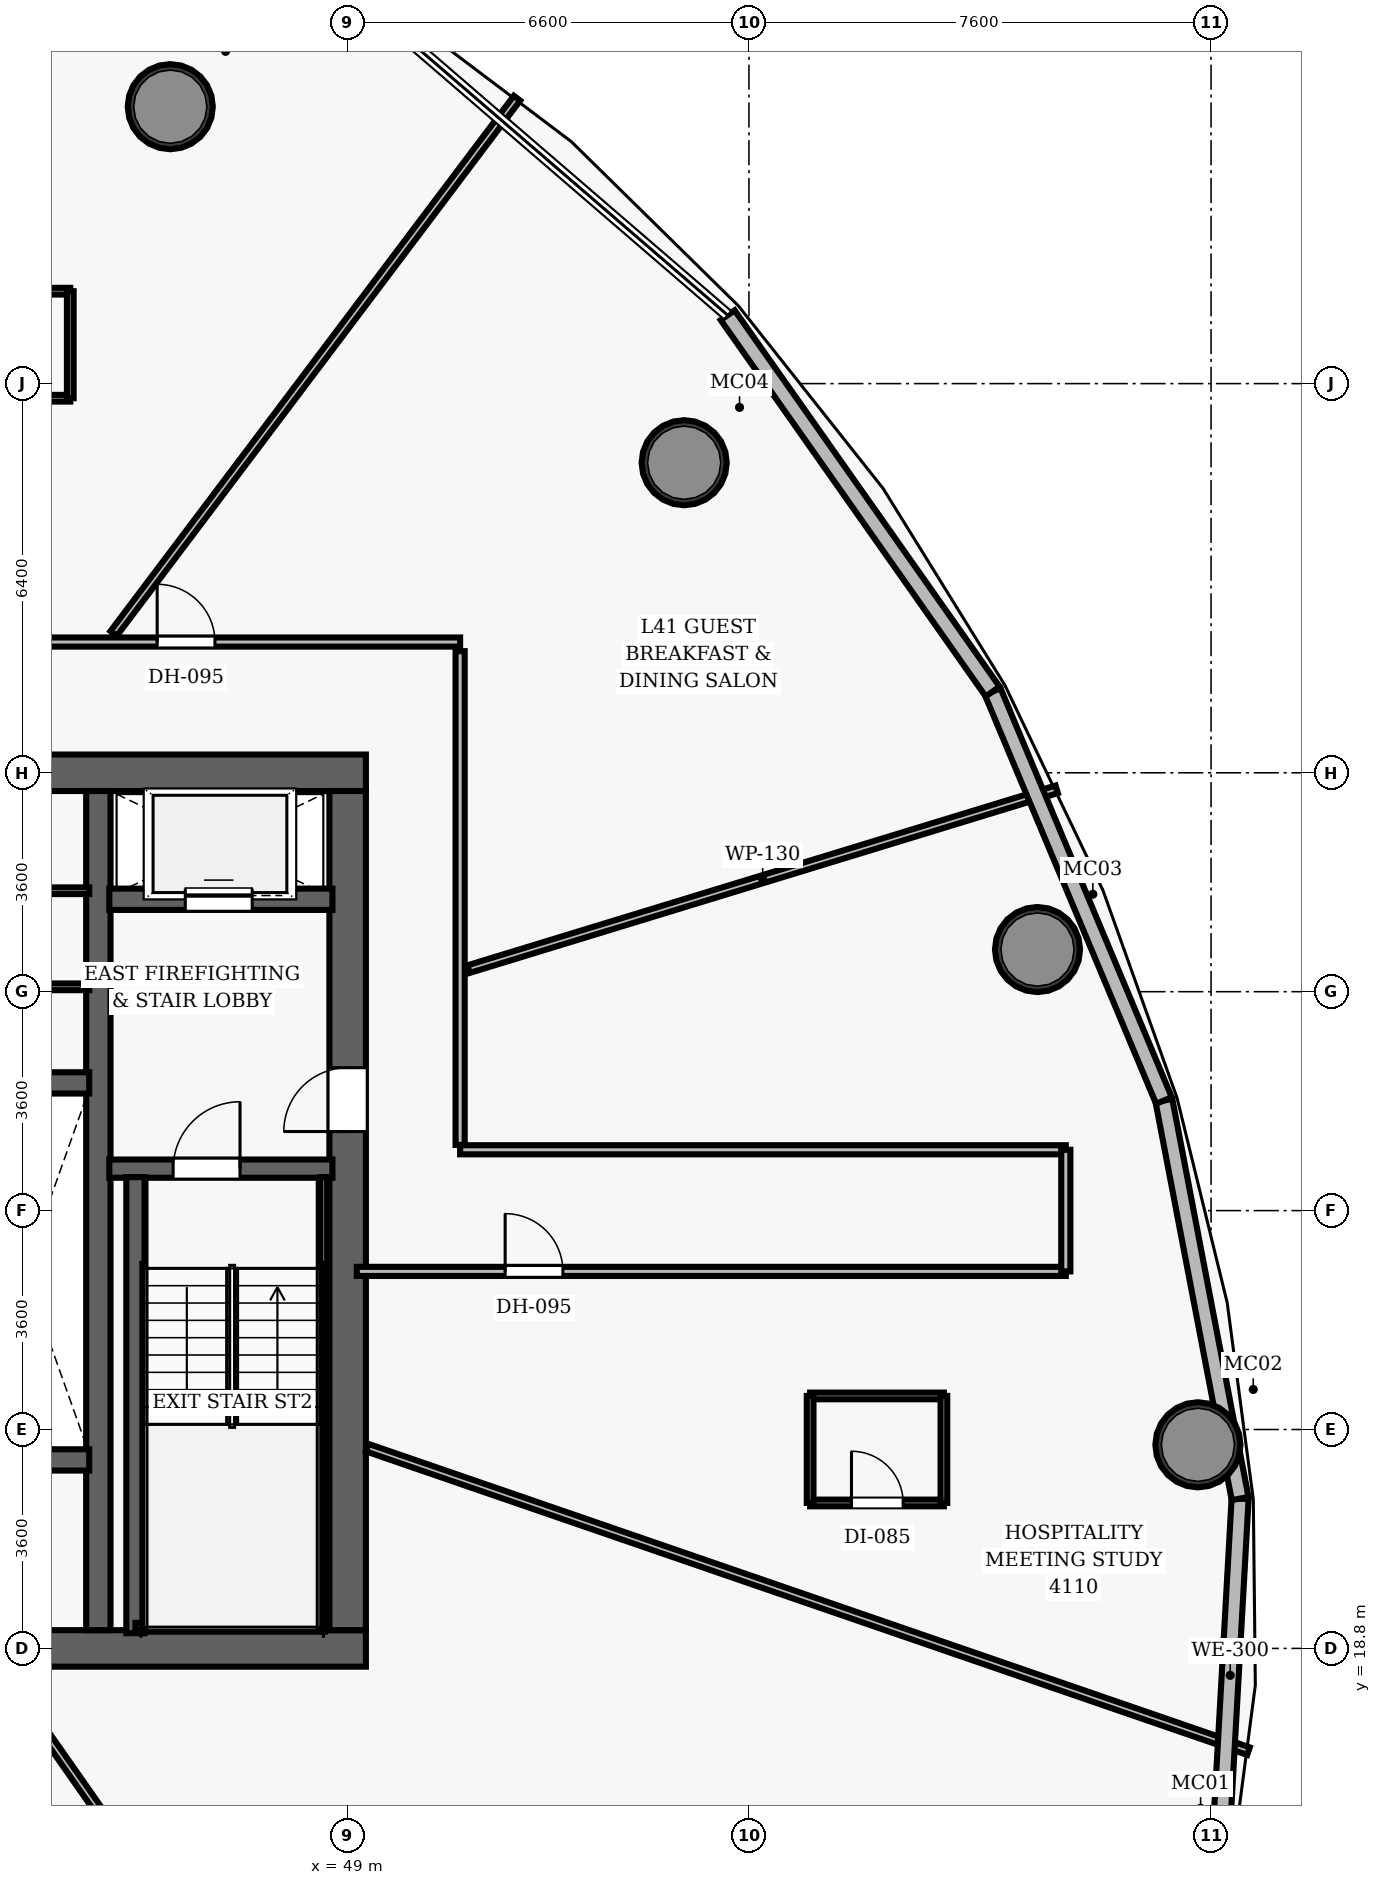
"""IFC4 building model, lengths in metres.
Left out: names, types, materials, properties, quantities, classifications, styles, units other than length and angle.
Written with IfcOpenShell. Run it as: python <this file> out.ifc"""

import sys

from ifc_helpers import new_model, si_unit, direction, frame, frame_2d, origin, origin_2d, place, context, subcontext, project, spatial, rectangle, hollow_circle, extrude, element, fill, save


model = new_model("IFC4")
c1 = context("Model", 3, precision=1e-05, world=origin(), true_north=direction((0.0, 1.0)))
c2 = subcontext(c1, "Body", "Model", "MODEL_VIEW")
j1 = project(units=[si_unit("LENGTHUNIT", "METRE"), si_unit("PLANEANGLEUNIT", "RADIAN")], contexts=[c1])
p1 = place(None, origin())
s1 = spatial("IfcSite", under=j1, at=p1, CompositionType="ELEMENT")
p2 = place(p1, origin())
s2 = spatial("IfcBuilding", under=s1, at=p2, CompositionType="ELEMENT")
p3 = place(p2, frame((0.0, 0.0, 162.3)))
s3 = spatial("IfcBuildingStorey", under=s2, at=p3, CompositionType="ELEMENT", Elevation=162.3)
p4 = place(p3, frame((26.7, 18.8, 0.0), z_axis=(0.0, 0.0, 1.0), x_axis=(1.0, 0.0, 0.0)))
e1 = element("IfcWall", 1, at=p4, inside=s3, PredefinedType="SHEAR", context=c2, shape_type="SweptSolid", body=[
    extrude(rectangle(XDim=22.6, YDim=0.6, at=frame_2d((11.3, 0.0))), origin(), (0.0, 0.0, 1.0), 3.5),
])
p5 = place(p4, frame((14.52, 0.0, 0.0)))
e2 = element("IfcOpeningElement", 2, at=p5, cuts=e1, PredefinedType="OPENING", context=c2, shape_type="SweptSolid", body=[
    extrude(rectangle(XDim=1.05, YDim=2.15, at=frame_2d((0.525, 1.075))), frame((0.0, 0.31, 0.0), z_axis=(0.0, -1.0, 0.0), x_axis=(1.0, 0.0, 0.0)), (0.0, 0.0, 1.0), 0.62),
])
p6 = place(p3, frame((26.7, 33.2, 0.0), z_axis=(0.0, 0.0, 1.0), x_axis=(1.0, 0.0, 0.0)))
e3 = element("IfcWall", 3, at=p6, inside=s3, PredefinedType="SHEAR", context=c2, shape_type="SweptSolid", body=[
    extrude(rectangle(XDim=22.6, YDim=0.6, at=frame_2d((11.3, 0.0))), origin(), (0.0, 0.0, 1.0), 3.5),
])
p7 = place(p6, frame((4.62, 0.0, 0.0)))
e4 = element("IfcOpeningElement", 4, at=p7, cuts=e3, PredefinedType="OPENING", context=c2, shape_type="SweptSolid", body=[
    extrude(rectangle(XDim=1.05, YDim=2.15, at=frame_2d((0.525, 1.075))), frame((0.0, 0.31, 0.0), z_axis=(0.0, -1.0, 0.0), x_axis=(1.0, 0.0, 0.0)), (0.0, 0.0, 1.0), 0.62),
])
p8 = place(p6, frame((14.52, 0.0, 0.0)))
e5 = element("IfcOpeningElement", 5, at=p8, cuts=e3, PredefinedType="OPENING", context=c2, shape_type="SweptSolid", body=[
    extrude(rectangle(XDim=1.05, YDim=2.15, at=frame_2d((0.525, 1.075))), frame((0.0, 0.31, 0.0), z_axis=(0.0, -1.0, 0.0), x_axis=(1.0, 0.0, 0.0)), (0.0, 0.0, 1.0), 0.62),
])
p9 = place(p3, frame((49.0, 19.1, 0.0), z_axis=(0.0, 0.0, 1.0), x_axis=(0.0, 1.0, 0.0)))
e6 = element("IfcWall", 6, at=p9, inside=s3, PredefinedType="SHEAR", context=c2, shape_type="SweptSolid", body=[
    extrude(rectangle(XDim=13.8, YDim=0.6, at=frame_2d((6.9, 0.0))), origin(), (0.0, 0.0, 1.0), 3.5),
])
p10 = place(p9, frame((8.2, 0.0, 0.0)))
e7 = element("IfcOpeningElement", 7, at=p10, cuts=e6, PredefinedType="OPENING", context=c2, shape_type="SweptSolid", body=[
    extrude(rectangle(XDim=1.05, YDim=2.15, at=frame_2d((0.525, 1.075))), frame((0.0, 0.31, 0.0), z_axis=(0.0, -1.0, 0.0), x_axis=(1.0, 0.0, 0.0)), (0.0, 0.0, 1.0), 0.62),
])
p11 = place(p3, frame((44.9, 19.1, 0.0), z_axis=(0.0, 0.0, 1.0), x_axis=(0.0, 1.0, 0.0)))
e8 = element("IfcWall", 8, at=p11, inside=s3, PredefinedType="SHEAR", context=c2, shape_type="SweptSolid", body=[
    extrude(rectangle(XDim=13.8, YDim=0.4, at=frame_2d((6.9, 0.0))), origin(), (0.0, 0.0, 1.0), 3.5),
])
for number, where, z_axis, x_axis in (
    (9, (62.984, 22.148, 0.0), (0.0, 0.0, 1.0), (1.0, 0.0, 0.0)),
    (10, (60.346, 30.293, 0.0), (0.0, 0.0, 1.0), (1.0, 0.0, 0.0)),
    (11, (54.535, 38.299, 0.0), (0.0, 0.0, 1.0), (1.0, 0.0, 0.0)),
    (12, (46.083, 44.154, 0.0), (0.0, 0.0, 1.0), (1.0, 0.0, 0.0)),
):
    element("IfcColumn", number, at=place(p3, frame(where, z_axis=z_axis, x_axis=x_axis)), inside=s3, PredefinedType="COLUMN", context=c2, shape_type="SweptSolid", body=[
        extrude(hollow_circle(Radius=0.7, WallThickness=0.055, at=origin_2d()), origin(), (0.0, 0.0, 1.0), 3.5),
    ])
p12 = place(p3, frame((45.08, 26.69, 0.0), z_axis=(0.0, 0.0, 1.0), x_axis=(1.0, 0.0, 0.0)))
e13 = element("IfcWall", 13, at=p12, inside=s3, PredefinedType="SHEAR", context=c2, shape_type="SweptSolid", body=[
    extrude(rectangle(XDim=3.67, YDim=0.3, at=frame_2d((1.835, 0.0))), origin(), (0.0, 0.0, 1.0), 3.5),
])
p13 = place(p12, frame((1.05, 0.0, 0.0)))
e14 = element("IfcOpeningElement", 14, at=p13, cuts=e13, PredefinedType="OPENING", context=c2, shape_type="SweptSolid", body=[
    extrude(rectangle(XDim=1.1, YDim=2.15, at=frame_2d((0.55, 1.075))), frame((0.0, 0.16, 0.0), z_axis=(0.0, -1.0, 0.0), x_axis=(1.0, 0.0, 0.0)), (0.0, 0.0, 1.0), 0.32),
])
p14 = place(p3, frame((45.51, 19.05, 0.0), z_axis=(0.0, 0.0, 1.0), x_axis=(0.0, 1.0, 0.0)))
e15 = element("IfcWall", 15, at=p14, inside=s3, PredefinedType="SHEAR", context=c2, shape_type="SweptSolid", body=[
    extrude(rectangle(XDim=7.5, YDim=0.3, at=frame_2d((3.75, 0.0))), origin(), (0.0, 0.0, 1.0), 3.5),
])
p15 = place(p3, frame((48.605, 19.1, 0.0), z_axis=(0.0, 0.0, 1.0), x_axis=(0.0, 1.0, 0.0)))
e16 = element("IfcWall", 16, at=p15, inside=s3, PredefinedType="SHEAR", context=c2, shape_type="SweptSolid", body=[
    extrude(rectangle(XDim=7.45, YDim=0.12, at=frame_2d((3.725, 0.0))), origin(), (0.0, 0.0, 1.0), 3.5),
])
p16 = place(p3, frame((45.51, 19.16, 0.0), z_axis=(0.0, 0.0, 1.0), x_axis=(1.0, 0.0, 0.0)))
e17 = element("IfcWall", 17, at=p16, inside=s3, PredefinedType="SHEAR", context=c2, shape_type="SweptSolid", body=[
    extrude(rectangle(XDim=3.095, YDim=0.12, at=frame_2d((1.547, 0.0))), origin(), (0.0, 0.0, 1.0), 3.5),
])
p17 = place(p3, frame((45.08, 31.12, 0.0), z_axis=(0.0, 0.0, 1.0), x_axis=(1.0, 0.0, 0.0)))
e18 = element("IfcWall", 18, at=p17, inside=s3, PredefinedType="SHEAR", context=c2, shape_type="SweptSolid", body=[
    extrude(rectangle(XDim=3.67, YDim=0.35, at=frame_2d((1.835, 0.0))), origin(), (0.0, 0.0, 1.0), 2.565),
])
p18 = place(p17, frame((1.25, 0.0, 0.0)))
e19 = element("IfcOpeningElement", 19, at=p18, cuts=e18, PredefinedType="OPENING", context=c2, shape_type="SweptSolid", body=[
    extrude(rectangle(XDim=1.1, YDim=2.15, at=frame_2d((0.55, 1.075))), frame((0.0, 0.185, 0.0), z_axis=(0.0, -1.0, 0.0), x_axis=(1.0, 0.0, 0.0)), (0.0, 0.0, 1.0), 0.37),
])
for number, where, z_axis, x_axis in (
    (20, (42.72, 21.9, 0.0), (0.0, 0.0, 1.0), (1.0, 0.0, 0.0)),
    (21, (42.72, 28.1, 0.0), (0.0, 0.0, 1.0), (1.0, 0.0, 0.0)),
):
    element("IfcWall", number, at=place(p3, frame(where, z_axis=z_axis, x_axis=x_axis)), inside=s3, PredefinedType="SHEAR", context=c2, shape_type="SweptSolid", body=[
        extrude(rectangle(XDim=2.03, YDim=0.35, at=frame_2d((1.015, 0.0))), origin(), (0.0, 0.0, 1.0), 2.565),
    ])
for number, where, z_axis, x_axis in (
    (22, (42.55, 29.68, 0.0), (0.0, 0.0, 1.0), (1.0, 0.0, 0.0)),
    (23, (42.55, 31.26, 0.0), (0.0, 0.0, 1.0), (1.0, 0.0, 0.0)),
):
    element("IfcWall", number, at=place(p3, frame(where, z_axis=z_axis, x_axis=x_axis)), inside=s3, PredefinedType="PARTITIONING", context=c2, shape_type="SweptSolid", body=[
        extrude(rectangle(XDim=2.2, YDim=0.11, at=frame_2d((1.1, 0.0))), origin(), (0.0, 0.0, 1.0), 2.565),
    ])
p19 = place(p3, frame((24.85, 35.35, 0.0), z_axis=(0.0, 0.0, 1.0), x_axis=(1.0, 0.0, 0.0)))
e24 = element("IfcWall", 24, at=p19, inside=s3, PredefinedType="PARTITIONING", context=c2, shape_type="SweptSolid", body=[
    extrude(rectangle(XDim=26.0, YDim=0.15, at=frame_2d((13.0, 0.0))), origin(), (0.0, 0.0, 1.0), 2.565),
])
p20 = place(p19, frame((21.017, 0.0, 0.0)))
e25 = element("IfcOpeningElement", 25, at=p20, cuts=e24, PredefinedType="OPENING", context=c2, shape_type="SweptSolid", body=[
    extrude(rectangle(XDim=0.95, YDim=2.15, at=frame_2d((0.475, 1.075))), frame((0.0, 0.085, 0.0), z_axis=(0.0, -1.0, 0.0), x_axis=(1.0, 0.0, 0.0)), (0.0, 0.0, 1.0), 0.17),
])
p21 = place(p19, frame((14.438, 0.0, 0.0)))
e26 = element("IfcOpeningElement", 26, at=p21, cuts=e24, PredefinedType="OPENING", context=c2, shape_type="SweptSolid", body=[
    extrude(rectangle(XDim=0.95, YDim=2.15, at=frame_2d((0.475, 1.075))), frame((0.0, 0.085, 0.0), z_axis=(0.0, -1.0, 0.0), x_axis=(1.0, 0.0, 0.0)), (0.0, 0.0, 1.0), 0.17),
])
p22 = place(p19, frame((11.287, 0.0, 0.0)))
e27 = element("IfcOpeningElement", 27, at=p22, cuts=e24, PredefinedType="OPENING", context=c2, shape_type="SweptSolid", body=[
    extrude(rectangle(XDim=0.95, YDim=2.15, at=frame_2d((0.475, 1.075))), frame((0.0, 0.085, 0.0), z_axis=(0.0, -1.0, 0.0), x_axis=(1.0, 0.0, 0.0)), (0.0, 0.0, 1.0), 0.17),
])
p23 = place(p3, frame((50.85, 27.08, 0.0), z_axis=(0.0, 0.0, 1.0), x_axis=(0.0, 1.0, 0.0)))
e28 = element("IfcWall", 28, at=p23, inside=s3, PredefinedType="PARTITIONING", context=c2, shape_type="SweptSolid", body=[
    extrude(rectangle(XDim=8.12, YDim=0.15, at=frame_2d((4.06, 0.0))), origin(), (0.0, 0.0, 1.0), 2.565),
])
p24 = place(p3, frame((50.85, 27.0, 0.0), z_axis=(0.0, 0.0, 1.0), x_axis=(1.0, 0.0, 0.0)))
e29 = element("IfcWall", 29, at=p24, inside=s3, PredefinedType="PARTITIONING", context=c2, shape_type="SweptSolid", body=[
    extrude(rectangle(XDim=9.961, YDim=0.15, at=frame_2d((4.98, 0.0))), origin(), (0.0, 0.0, 1.0), 2.565),
])
p25 = place(p3, frame((49.15, 25.0, 0.0), z_axis=(0.0, 0.0, 1.0), x_axis=(1.0, 0.0, 0.0)))
e30 = element("IfcWall", 30, at=p25, inside=s3, PredefinedType="PARTITIONING", context=c2, shape_type="SweptSolid", body=[
    extrude(rectangle(XDim=11.661, YDim=0.15, at=frame_2d((5.831, 0.0))), origin(), (0.0, 0.0, 1.0), 2.565),
])
p26 = place(p25, frame((2.44, 0.0, 0.0)))
e31 = element("IfcOpeningElement", 31, at=p26, cuts=e30, PredefinedType="OPENING", context=c2, shape_type="SweptSolid", body=[
    extrude(rectangle(XDim=0.95, YDim=2.15, at=frame_2d((0.475, 1.075))), frame((0.0, 0.085, 0.0), z_axis=(0.0, -1.0, 0.0), x_axis=(1.0, 0.0, 0.0)), (0.0, 0.0, 1.0), 0.17),
])
p27 = place(p3, frame((60.811, 25.0, 0.0), z_axis=(0.0, 0.0, 1.0), x_axis=(0.0, 1.0, 0.0)))
e32 = element("IfcWall", 32, at=p27, inside=s3, PredefinedType="PARTITIONING", context=c2, shape_type="SweptSolid", body=[
    extrude(rectangle(XDim=2.0, YDim=0.15, at=frame_2d((1.0, 0.0))), origin(), (0.0, 0.0, 1.0), 2.565),
])
p28 = place(p3, frame((50.99, 29.971, 0.0), z_axis=(0.0, 0.0, 1.0), x_axis=(0.956308272005, 0.29236020402, 0.0)))
e33 = element("IfcWall", 33, at=p28, inside=s3, PredefinedType="PARTITIONING", context=c2, shape_type="SweptSolid", body=[
    extrude(rectangle(XDim=10.114, YDim=0.13, at=frame_2d((5.057, 0.0))), origin(), (0.0, 0.0, 1.0), 2.565),
])
p29 = place(p3, frame((45.151, 35.49, 0.0), z_axis=(0.0, 0.0, 1.0), x_axis=(0.60181625772, 0.798634579732, 0.0)))
e34 = element("IfcWall", 34, at=p29, inside=s3, PredefinedType="PARTITIONING", context=c2, shape_type="SweptSolid", body=[
    extrude(rectangle(XDim=11.024, YDim=0.13, at=frame_2d((5.512, 0.0))), origin(), (0.0, 0.0, 1.0), 2.565),
])
p30 = place(p3, frame((43.266, 18.48, 0.0), z_axis=(0.0, 0.0, 1.0), x_axis=(0.57357232701, -0.819154921665, 0.0)))
e35 = element("IfcWall", 35, at=p30, inside=s3, PredefinedType="PARTITIONING", context=c2, shape_type="SweptSolid", body=[
    extrude(rectangle(XDim=17.281, YDim=0.13, at=frame_2d((8.641, 0.0))), origin(), (0.0, 0.0, 1.0), 2.565),
])
p31 = place(p3, frame((49.32, 22.102, 0.0), z_axis=(0.0, 0.0, 1.0), x_axis=(0.945519103615, -0.325566620984, 0.0)))
e36 = element("IfcWall", 36, at=p31, inside=s3, PredefinedType="PARTITIONING", context=c2, shape_type="SweptSolid", body=[
    extrude(rectangle(XDim=15.331, YDim=0.13, at=frame_2d((7.666, 0.0))), origin(), (0.0, 0.0, 1.0), 2.565),
])
p32 = place(p3, frame((42.238, 39.36, 0.0), z_axis=(0.0, 0.0, 1.0), x_axis=(1.0, 0.0, 0.0)))
e37 = element("IfcWall", 37, at=p32, inside=s3, PredefinedType="PARTITIONING", context=c2, shape_type="SweptSolid", body=[
    extrude(rectangle(XDim=2.2, YDim=0.11, at=frame_2d((1.1, 0.0))), origin(), (0.0, 0.0, 1.0), 2.565),
])
p33 = place(p3, frame((42.238, 41.12, 0.0), z_axis=(0.0, 0.0, 1.0), x_axis=(1.0, 0.0, 0.0)))
e38 = element("IfcWall", 38, at=p33, inside=s3, PredefinedType="PARTITIONING", context=c2, shape_type="SweptSolid", body=[
    extrude(rectangle(XDim=2.2, YDim=0.11, at=frame_2d((1.1, 0.0))), origin(), (0.0, 0.0, 1.0), 2.565),
])
p34 = place(p33, frame((0.68, 0.0, 0.0)))
e39 = element("IfcOpeningElement", 39, at=p34, cuts=e38, PredefinedType="OPENING", context=c2, shape_type="SweptSolid", body=[
    extrude(rectangle(XDim=0.85, YDim=2.1, at=frame_2d((0.425, 1.05))), frame((0.0, 0.065, 0.0), z_axis=(0.0, -1.0, 0.0), x_axis=(1.0, 0.0, 0.0)), (0.0, 0.0, 1.0), 0.13),
])
p35 = place(p3, frame((44.438, 39.36, 0.0), z_axis=(0.0, 0.0, 1.0), x_axis=(0.0, 1.0, 0.0)))
e40 = element("IfcWall", 40, at=p35, inside=s3, PredefinedType="PARTITIONING", context=c2, shape_type="SweptSolid", body=[
    extrude(rectangle(XDim=1.76, YDim=0.11, at=frame_2d((0.88, 0.0))), origin(), (0.0, 0.0, 1.0), 2.565),
])
p36 = place(p3, frame((56.606, 21.192, 0.0), z_axis=(0.0, 0.0, 1.0), x_axis=(1.0, 0.0, 0.0)))
e41 = element("IfcWall", 41, at=p36, inside=s3, PredefinedType="PARTITIONING", context=c2, shape_type="SweptSolid", body=[
    extrude(rectangle(XDim=2.2, YDim=0.11, at=frame_2d((1.1, 0.0))), origin(), (0.0, 0.0, 1.0), 2.565),
])
p37 = place(p36, frame((0.68, 0.0, 0.0)))
e42 = element("IfcOpeningElement", 42, at=p37, cuts=e41, PredefinedType="OPENING", context=c2, shape_type="SweptSolid", body=[
    extrude(rectangle(XDim=0.85, YDim=2.1, at=frame_2d((0.425, 1.05))), frame((0.0, 0.065, 0.0), z_axis=(0.0, -1.0, 0.0), x_axis=(1.0, 0.0, 0.0)), (0.0, 0.0, 1.0), 0.13),
])
p38 = place(p3, frame((56.606, 22.952, 0.0), z_axis=(0.0, 0.0, 1.0), x_axis=(1.0, 0.0, 0.0)))
e43 = element("IfcWall", 43, at=p38, inside=s3, PredefinedType="PARTITIONING", context=c2, shape_type="SweptSolid", body=[
    extrude(rectangle(XDim=2.2, YDim=0.11, at=frame_2d((1.1, 0.0))), origin(), (0.0, 0.0, 1.0), 2.565),
])
for number, where, z_axis, x_axis in (
    (44, (56.606, 21.192, 0.0), (0.0, 0.0, 1.0), (0.0, 1.0, 0.0)),
    (45, (58.806, 21.192, 0.0), (0.0, 0.0, 1.0), (0.0, 1.0, 0.0)),
):
    element("IfcWall", number, at=place(p3, frame(where, z_axis=z_axis, x_axis=x_axis)), inside=s3, PredefinedType="PARTITIONING", context=c2, shape_type="SweptSolid", body=[
        extrude(rectangle(XDim=1.76, YDim=0.11, at=frame_2d((0.88, 0.0))), origin(), (0.0, 0.0, 1.0), 2.565),
    ])
p39 = place(p3, frame((63.678, 21.264, 0.0), z_axis=(0.0, 0.0, 1.0), x_axis=(-0.055932126185, -0.99843457335, 0.0)))
e46 = element("IfcWall", 46, at=p39, inside=s3, PredefinedType="SOLIDWALL", context=c2, shape_type="SweptSolid", body=[
    extrude(rectangle(XDim=5.823, YDim=0.28, at=frame_2d((2.911, 0.0))), origin(), (0.0, 0.0, 1.0), 3.15),
])
p40 = place(p3, frame((62.425, 27.81, 0.0), z_axis=(0.0, 0.0, 1.0), x_axis=(0.188022651866, -0.982164692088, 0.0)))
e47 = element("IfcWall", 47, at=p40, inside=s3, PredefinedType="SOLIDWALL", context=c2, shape_type="SweptSolid", body=[
    extrude(rectangle(XDim=6.665, YDim=0.28, at=frame_2d((3.333, 0.0))), origin(), (0.0, 0.0, 1.0), 3.15),
])
p41 = place(p3, frame((59.608, 34.536, 0.0), z_axis=(0.0, 0.0, 1.0), x_axis=(0.3862765553, -0.922383013084, 0.0)))
e48 = element("IfcWall", 48, at=p41, inside=s3, PredefinedType="SOLIDWALL", context=c2, shape_type="SweptSolid", body=[
    extrude(rectangle(XDim=7.292, YDim=0.28, at=frame_2d((3.646, 0.0))), origin(), (0.0, 0.0, 1.0), 3.15),
])
p42 = place(p3, frame((55.25, 40.725, 0.0), z_axis=(0.0, 0.0, 1.0), x_axis=(0.575733066799, -0.817637716715, 0.0)))
e49 = element("IfcWall", 49, at=p42, inside=s3, PredefinedType="SOLIDWALL", context=c2, shape_type="SweptSolid", body=[
    extrude(rectangle(XDim=7.569, YDim=0.28, at=frame_2d((3.785, 0.0))), origin(), (0.0, 0.0, 1.0), 3.15),
])
p43 = place(p13, origin())
e50 = element("IfcDoor", 50, at=p43, inside=s3, OperationType="SINGLE_SWING_RIGHT", PredefinedType="DOOR", context=c2, shape_type="SweptSolid", body=[
    extrude(rectangle(XDim=1.1, YDim=2.15, at=frame_2d((0.55, 1.075))), frame((0.0, 0.025, 0.0), z_axis=(0.0, -1.0, 0.0), x_axis=(1.0, 0.0, 0.0)), (0.0, 0.0, 1.0), 0.05),
])
fill(e14, e50)
p44 = place(p10, origin())
e51 = element("IfcDoor", 51, at=p44, inside=s3, OperationType="SINGLE_SWING_LEFT", PredefinedType="DOOR", context=c2, shape_type="SweptSolid", body=[
    extrude(rectangle(XDim=1.05, YDim=2.15, at=frame_2d((0.525, 1.075))), frame((0.0, 0.025, 0.0), z_axis=(0.0, -1.0, 0.0), x_axis=(1.0, 0.0, 0.0)), (0.0, 0.0, 1.0), 0.05),
])
fill(e7, e51)
p45 = place(p20, origin())
e52 = element("IfcDoor", 52, at=p45, inside=s3, OperationType="SINGLE_SWING_LEFT", PredefinedType="DOOR", context=c2, shape_type="SweptSolid", body=[
    extrude(rectangle(XDim=0.95, YDim=2.15, at=frame_2d((0.475, 1.075))), frame((0.0, 0.025, 0.0), z_axis=(0.0, -1.0, 0.0), x_axis=(1.0, 0.0, 0.0)), (0.0, 0.0, 1.0), 0.05),
])
fill(e25, e52)
p46 = place(p26, origin())
e53 = element("IfcDoor", 53, at=p46, inside=s3, OperationType="SINGLE_SWING_LEFT", PredefinedType="DOOR", context=c2, shape_type="SweptSolid", body=[
    extrude(rectangle(XDim=0.95, YDim=2.15, at=frame_2d((0.475, 1.075))), frame((0.0, 0.025, 0.0), z_axis=(0.0, -1.0, 0.0), x_axis=(1.0, 0.0, 0.0)), (0.0, 0.0, 1.0), 0.05),
])
fill(e31, e53)
p47 = place(p37, origin())
e54 = element("IfcDoor", 54, at=p47, inside=s3, OperationType="SINGLE_SWING_LEFT", PredefinedType="DOOR", context=c2, shape_type="SweptSolid", body=[
    extrude(rectangle(XDim=0.85, YDim=2.1, at=frame_2d((0.425, 1.05))), frame((0.0, 0.025, 0.0), z_axis=(0.0, -1.0, 0.0), x_axis=(1.0, 0.0, 0.0)), (0.0, 0.0, 1.0), 0.05),
])
fill(e42, e54)
p48 = place(p18, origin())
e55 = element("IfcDoor", 55, at=p48, inside=s3, OperationType="SLIDING_TO_LEFT", PredefinedType="DOOR", context=c2, shape_type="SweptSolid", body=[
    extrude(rectangle(XDim=1.1, YDim=2.15, at=frame_2d((0.55, 1.075))), frame((0.0, 0.025, 0.0), z_axis=(0.0, -1.0, 0.0), x_axis=(1.0, 0.0, 0.0)), (0.0, 0.0, 1.0), 0.05),
])
fill(e19, e55)
save(model, sys.argv[1])
